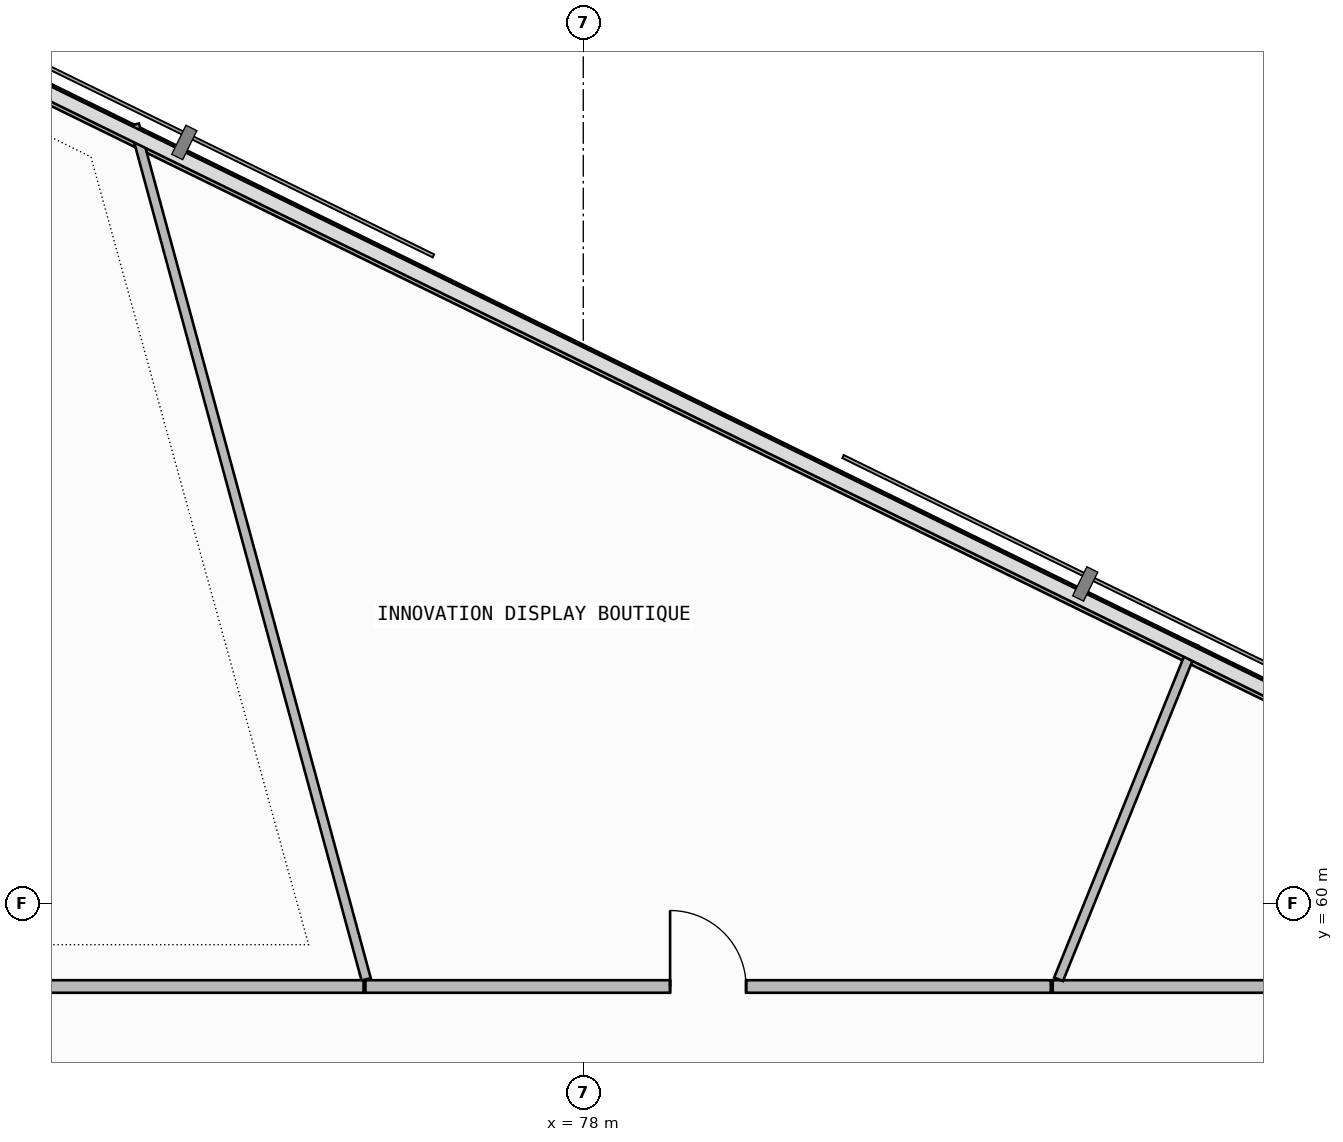
"""IFC4 building model, lengths in metres.
Left out: names, types, materials, properties, quantities, classifications, styles, units other than length and angle.
Written with IfcOpenShell. Run it as: python <this file> out.ifc"""

import sys

from ifc_helpers import new_model, si_unit, direction, frame, frame_2d, origin, place, context, subcontext, project, spatial, rectangle, extrude, element, fill, save


model = new_model("IFC4")
c1 = context("Model", 3, precision=1e-05, world=origin(), true_north=direction((0.0, 1.0)))
c2 = subcontext(c1, "Body", "Model", "MODEL_VIEW")
j1 = project(units=[si_unit("LENGTHUNIT", "METRE"), si_unit("PLANEANGLEUNIT", "RADIAN")], contexts=[c1])
p1 = place(None, origin())
s1 = spatial("IfcSite", under=j1, at=p1, CompositionType="ELEMENT")
p2 = place(p1, origin())
s2 = spatial("IfcBuilding", under=s1, at=p2, CompositionType="ELEMENT")
p3 = place(p2, frame((0.0, 0.0, 110.1)))
s3 = spatial("IfcBuildingStorey", under=s2, at=p3, CompositionType="ELEMENT", Elevation=110.1)
p4 = place(p3, frame((88.921, 61.823, 0.0), z_axis=(0.0, 0.0, 1.0), x_axis=(-0.897993533426, 0.440008652103, 0.0)))
e1 = element("IfcWall", 1, at=p4, inside=s3, PredefinedType="PARAPET", context=c2, shape_type="SweptSolid", body=[
    extrude(rectangle(XDim=26.864, YDim=0.2, at=frame_2d((13.432, 0.0))), origin(), (0.0, 0.0, 1.0), 1.15),
])
p5 = place(p3, frame((93.427, 58.909, 0.0), z_axis=(0.0, 0.0, 1.0), x_axis=(-1.0, 0.0, 0.0)))
e2 = element("IfcWall", 2, at=p5, inside=s3, PredefinedType="PARTITIONING", context=c2, shape_type="SweptSolid", body=[
    extrude(rectangle(XDim=9.251, YDim=0.165, at=frame_2d((4.625, 0.0))), origin(), (0.0, 0.0, 1.0), 2.725),
])
p6 = place(p3, frame((84.254, 59.003, 0.0), z_axis=(0.0, 0.0, 1.0), x_axis=(0.374883024876, 0.927072121067, 0.0)))
e3 = element("IfcWall", 3, at=p6, inside=s3, PredefinedType="PARTITIONING", context=c2, shape_type="SweptSolid", body=[
    extrude(rectangle(XDim=4.757, YDim=0.125, at=frame_2d((2.379, 0.0))), origin(), (0.0, 0.0, 1.0), 3.34),
])
p7 = place(p3, frame((84.151, 58.909, 0.0), z_axis=(0.0, 0.0, 1.0), x_axis=(-1.0, 0.0, 0.0)))
e4 = element("IfcWall", 4, at=p7, inside=s3, PredefinedType="PARTITIONING", context=c2, shape_type="SweptSolid", body=[
    extrude(rectangle(XDim=9.017, YDim=0.165, at=frame_2d((4.508, 0.0))), origin(), (0.0, 0.0, 1.0), 3.34),
])
p8 = place(p7, frame((4.008, 0.0, 0.0)))
e5 = element("IfcOpeningElement", 5, at=p8, cuts=e4, PredefinedType="OPENING", context=c2, shape_type="SweptSolid", body=[
    extrude(rectangle(XDim=1.0, YDim=2.2, at=frame_2d((0.5, 1.1))), frame((0.0, 0.093, 0.0), z_axis=(0.0, -1.0, 0.0), x_axis=(1.0, 0.0, 0.0)), (0.0, 0.0, 1.0), 0.185),
])
p9 = place(p3, frame((75.144, 59.003, 0.0), z_axis=(0.0, 0.0, 1.0), x_axis=(-0.261861678482, 0.965105414627, 0.0)))
e6 = element("IfcWall", 6, at=p9, inside=s3, PredefinedType="PARTITIONING", context=c2, shape_type="SweptSolid", body=[
    extrude(rectangle(XDim=11.649, YDim=0.125, at=frame_2d((5.825, 0.0))), origin(), (0.0, 0.0, 1.0), 3.34),
])
p10 = place(p3, frame((75.109, 58.909, 0.0), z_axis=(0.0, 0.0, 1.0), x_axis=(-1.0, 0.0, 0.0)))
e7 = element("IfcWall", 7, at=p10, inside=s3, PredefinedType="PARTITIONING", context=c2, shape_type="SweptSolid", body=[
    extrude(rectangle(XDim=5.626, YDim=0.165, at=frame_2d((2.813, 0.0))), origin(), (0.0, 0.0, 1.0), 2.725),
])
p11 = place(p8, frame((1.0, 0.0, 0.0), z_axis=(0.0, 0.0, 1.0), x_axis=(-1.0, 0.0, 0.0)))
e8 = element("IfcDoor", 8, at=p11, inside=s3, OperationType="SINGLE_SWING_LEFT", PredefinedType="DOOR", context=c2, shape_type="SweptSolid", body=[
    extrude(rectangle(XDim=1.0, YDim=2.2, at=frame_2d((0.5, 1.1))), frame((0.0, 0.025, 0.0), z_axis=(0.0, -1.0, 0.0), x_axis=(1.0, 0.0, 0.0)), (0.0, 0.0, 1.0), 0.05),
])
fill(e5, e8)
save(model, sys.argv[1])
